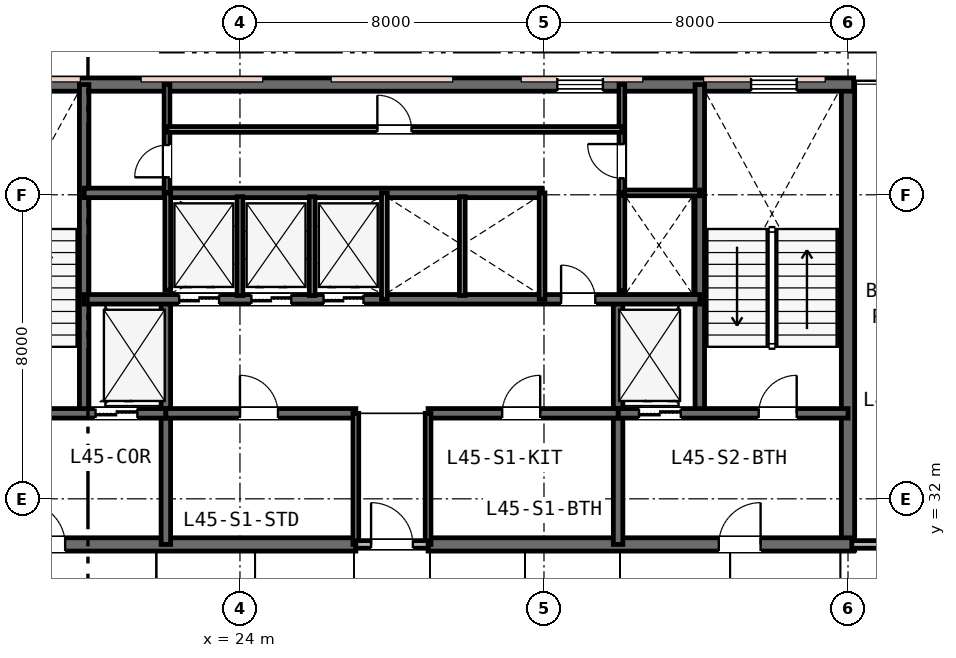
"""IFC4 building model, lengths in metres.
Left out: names, types, materials, properties, quantities, classifications, styles, units other than length and angle.
Written with IfcOpenShell. Run it as: python <this file> out.ifc"""

import sys

from ifc_helpers import new_model, si_unit, direction, frame, frame_2d, origin, place, context, subcontext, project, spatial, rectangle, extrude, element, fill, save


model = new_model("IFC4")
c1 = context("Model", 3, precision=1e-05, world=origin(), true_north=direction((0.0, 1.0)))
c2 = subcontext(c1, "Body", "Model", "MODEL_VIEW")
j1 = project(units=[si_unit("LENGTHUNIT", "METRE"), si_unit("PLANEANGLEUNIT", "RADIAN")], contexts=[c1])
p1 = place(None, origin())
s1 = spatial("IfcSite", under=j1, at=p1, CompositionType="ELEMENT")
p2 = place(p1, origin())
s2 = spatial("IfcBuilding", under=s1, at=p2, CompositionType="ELEMENT")
p3 = place(p2, frame((0.0, 0.0, 175.8)))
s3 = spatial("IfcBuildingStorey", under=s2, at=p3, CompositionType="ELEMENT", Elevation=175.8)
p4 = place(p3, frame((40.0, 30.65, 0.0), z_axis=(0.0, 0.0, 1.0), x_axis=(0.0, 1.0, 0.0)))
e1 = element("IfcWall", 1, at=p4, inside=s3, PredefinedType="SHEAR", context=c2, shape_type="SweptSolid", body=[
    extrude(rectangle(XDim=12.3, YDim=0.35, at=frame_2d((6.15, 0.0))), origin(), (0.0, 0.0, 1.0), 3.6),
])
p5 = place(p3, frame((15.85, 42.9, 0.0), z_axis=(0.0, 0.0, 1.0), x_axis=(1.0, 0.0, 0.0)))
e2 = element("IfcWall", 2, at=p5, inside=s3, PredefinedType="SHEAR", context=c2, shape_type="SweptSolid", body=[
    extrude(rectangle(XDim=24.3, YDim=0.35, at=frame_2d((12.15, 0.0))), origin(), (0.0, 0.0, 1.0), 3.6),
])
p6 = place(p5, frame((1.6, 0.0, 0.95)))
e3 = element("IfcOpeningElement", 3, at=p6, cuts=e2, PredefinedType="OPENING", context=c2, shape_type="SweptSolid", body=[
    extrude(rectangle(XDim=1.2, YDim=1.6, at=frame_2d((0.6, 0.8))), frame((0.0, 0.185, 0.0), z_axis=(0.0, -1.0, 0.0), x_axis=(1.0, 0.0, 0.0)), (0.0, 0.0, 1.0), 0.37),
])
p7 = place(p5, frame((16.5, 0.0, 0.95)))
e4 = element("IfcOpeningElement", 4, at=p7, cuts=e2, PredefinedType="OPENING", context=c2, shape_type="SweptSolid", body=[
    extrude(rectangle(XDim=1.2, YDim=1.6, at=frame_2d((0.6, 0.8))), frame((0.0, 0.185, 0.0), z_axis=(0.0, -1.0, 0.0), x_axis=(1.0, 0.0, 0.0)), (0.0, 0.0, 1.0), 0.37),
])
p8 = place(p5, frame((21.6, 0.0, 0.95)))
e5 = element("IfcOpeningElement", 5, at=p8, cuts=e2, PredefinedType="OPENING", context=c2, shape_type="SweptSolid", body=[
    extrude(rectangle(XDim=1.2, YDim=1.6, at=frame_2d((0.6, 0.8))), frame((0.0, 0.185, 0.0), z_axis=(0.0, -1.0, 0.0), x_axis=(1.0, 0.0, 0.0)), (0.0, 0.0, 1.0), 0.37),
])
p9 = place(p3, frame((15.85, 30.8, 0.0), z_axis=(0.0, 0.0, 1.0), x_axis=(1.0, 0.0, 0.0)))
e6 = element("IfcWall", 6, at=p9, inside=s3, PredefinedType="SHEAR", context=c2, shape_type="SweptSolid", body=[
    extrude(rectangle(XDim=11.2, YDim=0.35, at=frame_2d((5.6, 0.0))), origin(), (0.0, 0.0, 1.0), 3.6),
])
p10 = place(p9, frame((2.45, 0.0, 0.0)))
e7 = element("IfcOpeningElement", 7, at=p10, cuts=e6, PredefinedType="OPENING", context=c2, shape_type="SweptSolid", body=[
    extrude(rectangle(XDim=1.1, YDim=2.15, at=frame_2d((0.55, 1.075))), frame((0.0, 0.185, 0.0), z_axis=(0.0, -1.0, 0.0), x_axis=(1.0, 0.0, 0.0)), (0.0, 0.0, 1.0), 0.37),
])
p11 = place(p3, frame((28.95, 30.8, 0.0), z_axis=(0.0, 0.0, 1.0), x_axis=(1.0, 0.0, 0.0)))
e8 = element("IfcWall", 8, at=p11, inside=s3, PredefinedType="SHEAR", context=c2, shape_type="SweptSolid", body=[
    extrude(rectangle(XDim=11.2, YDim=0.35, at=frame_2d((5.6, 0.0))), origin(), (0.0, 0.0, 1.0), 3.6),
])
p12 = place(p11, frame((7.65, 0.0, 0.0)))
e9 = element("IfcOpeningElement", 9, at=p12, cuts=e8, PredefinedType="OPENING", context=c2, shape_type="SweptSolid", body=[
    extrude(rectangle(XDim=1.1, YDim=2.15, at=frame_2d((0.55, 1.075))), frame((0.0, 0.185, 0.0), z_axis=(0.0, -1.0, 0.0), x_axis=(1.0, 0.0, 0.0)), (0.0, 0.0, 1.0), 0.37),
])
for number, where, z_axis, x_axis in (
    (10, (19.9, 34.25, 0.0), (0.0, 0.0, 1.0), (0.0, 1.0, 0.0)),
    (11, (36.1, 34.25, 0.0), (0.0, 0.0, 1.0), (0.0, 1.0, 0.0)),
):
    element("IfcWall", number, at=place(p3, frame(where, z_axis=z_axis, x_axis=x_axis)), inside=s3, PredefinedType="SHEAR", context=c2, shape_type="SweptSolid", body=[
        extrude(rectangle(XDim=8.65, YDim=0.25, at=frame_2d((4.325, 0.0))), origin(), (0.0, 0.0, 1.0), 3.6),
    ])
for number, where, z_axis, x_axis in (
    (12, (22.05, 30.8, 0.0), (0.0, 0.0, 1.0), (0.0, 1.0, 0.0)),
    (13, (33.95, 30.8, 0.0), (0.0, 0.0, 1.0), (0.0, 1.0, 0.0)),
):
    element("IfcWall", number, at=place(p3, frame(where, z_axis=z_axis, x_axis=x_axis)), inside=s3, PredefinedType="SHEAR", context=c2, shape_type="SweptSolid", body=[
        extrude(rectangle(XDim=6.45, YDim=0.25, at=frame_2d((3.225, 0.0))), origin(), (0.0, 0.0, 1.0), 3.6),
    ])
p13 = place(p3, frame((16.0, 34.25, 0.0), z_axis=(0.0, 0.0, 1.0), x_axis=(1.0, 0.0, 0.0)))
e14 = element("IfcWall", 14, at=p13, inside=s3, PredefinedType="SHEAR", context=c2, shape_type="SweptSolid", body=[
    extrude(rectangle(XDim=6.05, YDim=0.25, at=frame_2d((3.025, 0.0))), origin(), (0.0, 0.0, 1.0), 3.6),
])
p14 = place(p13, frame((1.25, 0.0, 0.0)))
e15 = element("IfcOpeningElement", 15, at=p14, cuts=e14, PredefinedType="OPENING", context=c2, shape_type="SweptSolid", body=[
    extrude(rectangle(XDim=1.0, YDim=2.15, at=frame_2d((0.5, 1.075))), frame((0.0, 0.135, 0.0), z_axis=(0.0, -1.0, 0.0), x_axis=(1.0, 0.0, 0.0)), (0.0, 0.0, 1.0), 0.27),
])
p15 = place(p13, frame((4.2, 0.0, 0.0)))
e16 = element("IfcOpeningElement", 16, at=p15, cuts=e14, PredefinedType="OPENING", context=c2, shape_type="SweptSolid", body=[
    extrude(rectangle(XDim=1.1, YDim=2.15, at=frame_2d((0.55, 1.075))), frame((0.0, 0.135, 0.0), z_axis=(0.0, -1.0, 0.0), x_axis=(1.0, 0.0, 0.0)), (0.0, 0.0, 1.0), 0.27),
])
p16 = place(p3, frame((33.95, 34.25, 0.0), z_axis=(0.0, 0.0, 1.0), x_axis=(1.0, 0.0, 0.0)))
e17 = element("IfcWall", 17, at=p16, inside=s3, PredefinedType="SHEAR", context=c2, shape_type="SweptSolid", body=[
    extrude(rectangle(XDim=6.05, YDim=0.25, at=frame_2d((3.025, 0.0))), origin(), (0.0, 0.0, 1.0), 3.6),
])
p17 = place(p16, frame((3.7, 0.0, 0.0)))
e18 = element("IfcOpeningElement", 18, at=p17, cuts=e17, PredefinedType="OPENING", context=c2, shape_type="SweptSolid", body=[
    extrude(rectangle(XDim=1.0, YDim=2.15, at=frame_2d((0.5, 1.075))), frame((0.0, 0.135, 0.0), z_axis=(0.0, -1.0, 0.0), x_axis=(1.0, 0.0, 0.0)), (0.0, 0.0, 1.0), 0.27),
])
p18 = place(p16, frame((0.55, 0.0, 0.0)))
e19 = element("IfcOpeningElement", 19, at=p18, cuts=e17, PredefinedType="OPENING", context=c2, shape_type="SweptSolid", body=[
    extrude(rectangle(XDim=1.1, YDim=2.15, at=frame_2d((0.55, 1.075))), frame((0.0, 0.135, 0.0), z_axis=(0.0, -1.0, 0.0), x_axis=(1.0, 0.0, 0.0)), (0.0, 0.0, 1.0), 0.27),
])
p19 = place(p3, frame((22.05, 34.25, 0.0), z_axis=(0.0, 0.0, 1.0), x_axis=(1.0, 0.0, 0.0)))
e20 = element("IfcWall", 20, at=p19, inside=s3, PredefinedType="SHEAR", context=c2, shape_type="SweptSolid", body=[
    extrude(rectangle(XDim=5.0, YDim=0.25, at=frame_2d((2.5, 0.0))), origin(), (0.0, 0.0, 1.0), 3.6),
])
p20 = place(p19, frame((1.95, 0.0, 0.0)))
e21 = element("IfcOpeningElement", 21, at=p20, cuts=e20, PredefinedType="OPENING", context=c2, shape_type="SweptSolid", body=[
    extrude(rectangle(XDim=1.0, YDim=2.15, at=frame_2d((0.5, 1.075))), frame((0.0, 0.135, 0.0), z_axis=(0.0, -1.0, 0.0), x_axis=(1.0, 0.0, 0.0)), (0.0, 0.0, 1.0), 0.27),
])
p21 = place(p3, frame((28.95, 34.25, 0.0), z_axis=(0.0, 0.0, 1.0), x_axis=(1.0, 0.0, 0.0)))
e22 = element("IfcWall", 22, at=p21, inside=s3, PredefinedType="SHEAR", context=c2, shape_type="SweptSolid", body=[
    extrude(rectangle(XDim=5.0, YDim=0.25, at=frame_2d((2.5, 0.0))), origin(), (0.0, 0.0, 1.0), 3.6),
])
p22 = place(p21, frame((1.95, 0.0, 0.0)))
e23 = element("IfcOpeningElement", 23, at=p22, cuts=e22, PredefinedType="OPENING", context=c2, shape_type="SweptSolid", body=[
    extrude(rectangle(XDim=1.0, YDim=2.15, at=frame_2d((0.5, 1.075))), frame((0.0, 0.135, 0.0), z_axis=(0.0, -1.0, 0.0), x_axis=(1.0, 0.0, 0.0)), (0.0, 0.0, 1.0), 0.27),
])
p23 = place(p3, frame((19.9, 37.25, 0.0), z_axis=(0.0, 0.0, 1.0), x_axis=(1.0, 0.0, 0.0)))
e24 = element("IfcWall", 24, at=p23, inside=s3, PredefinedType="SHEAR", context=c2, shape_type="SweptSolid", body=[
    extrude(rectangle(XDim=16.2, YDim=0.25, at=frame_2d((8.1, 0.0))), origin(), (0.0, 0.0, 1.0), 3.6),
])
p24 = place(p23, frame((12.55, 0.0, 0.0)))
e25 = element("IfcOpeningElement", 25, at=p24, cuts=e24, PredefinedType="OPENING", context=c2, shape_type="SweptSolid", body=[
    extrude(rectangle(XDim=0.9, YDim=2.15, at=frame_2d((0.45, 1.075))), frame((0.0, 0.135, 0.0), z_axis=(0.0, -1.0, 0.0), x_axis=(1.0, 0.0, 0.0)), (0.0, 0.0, 1.0), 0.27),
])
p25 = place(p23, frame((2.5, 0.0, 0.0)))
e26 = element("IfcOpeningElement", 26, at=p25, cuts=e24, PredefinedType="OPENING", context=c2, shape_type="SweptSolid", body=[
    extrude(rectangle(XDim=1.05, YDim=2.15, at=frame_2d((0.525, 1.075))), frame((0.0, 0.135, 0.0), z_axis=(0.0, -1.0, 0.0), x_axis=(1.0, 0.0, 0.0)), (0.0, 0.0, 1.0), 0.27),
])
p26 = place(p23, frame((4.4, 0.0, 0.0)))
e27 = element("IfcOpeningElement", 27, at=p26, cuts=e24, PredefinedType="OPENING", context=c2, shape_type="SweptSolid", body=[
    extrude(rectangle(XDim=1.05, YDim=2.15, at=frame_2d((0.525, 1.075))), frame((0.0, 0.135, 0.0), z_axis=(0.0, -1.0, 0.0), x_axis=(1.0, 0.0, 0.0)), (0.0, 0.0, 1.0), 0.27),
])
p27 = place(p23, frame((6.3, 0.0, 0.0)))
e28 = element("IfcOpeningElement", 28, at=p27, cuts=e24, PredefinedType="OPENING", context=c2, shape_type="SweptSolid", body=[
    extrude(rectangle(XDim=1.05, YDim=2.15, at=frame_2d((0.525, 1.075))), frame((0.0, 0.135, 0.0), z_axis=(0.0, -1.0, 0.0), x_axis=(1.0, 0.0, 0.0)), (0.0, 0.0, 1.0), 0.27),
])
p28 = place(p3, frame((19.9, 40.05, 0.0), z_axis=(0.0, 0.0, 1.0), x_axis=(1.0, 0.0, 0.0)))
e29 = element("IfcWall", 29, at=p28, inside=s3, PredefinedType="SHEAR", context=c2, shape_type="SweptSolid", body=[
    extrude(rectangle(XDim=12.05, YDim=0.25, at=frame_2d((6.025, 0.0))), origin(), (0.0, 0.0, 1.0), 3.6),
])
for number, where, z_axis, x_axis in (
    (30, (27.05, 30.8, 0.0), (0.0, 0.0, 1.0), (0.0, 1.0, 0.0)),
    (31, (28.95, 30.8, 0.0), (0.0, 0.0, 1.0), (0.0, 1.0, 0.0)),
):
    element("IfcWall", number, at=place(p3, frame(where, z_axis=z_axis, x_axis=x_axis)), inside=s3, PredefinedType="PLUMBINGWALL", context=c2, shape_type="SweptSolid", body=[
        extrude(rectangle(XDim=3.45, YDim=0.15, at=frame_2d((1.725, 0.0))), origin(), (0.0, 0.0, 1.0), 3.07),
    ])
p29 = place(p3, frame((27.05, 30.8, 0.0), z_axis=(0.0, 0.0, 1.0), x_axis=(1.0, 0.0, 0.0)))
e32 = element("IfcWall", 32, at=p29, inside=s3, PredefinedType="PARTITIONING", context=c2, shape_type="SweptSolid", body=[
    extrude(rectangle(XDim=1.9, YDim=0.2, at=frame_2d((0.95, 0.0))), origin(), (0.0, 0.0, 1.0), 3.07),
])
p30 = place(p29, frame((0.4, 0.0, 0.0)))
e33 = element("IfcOpeningElement", 33, at=p30, cuts=e32, PredefinedType="OPENING", context=c2, shape_type="SweptSolid", body=[
    extrude(rectangle(XDim=1.1, YDim=2.15, at=frame_2d((0.55, 1.075))), frame((0.0, 0.11, 0.0), z_axis=(0.0, -1.0, 0.0), x_axis=(1.0, 0.0, 0.0)), (0.0, 0.0, 1.0), 0.22),
])
p31 = place(p3, frame((22.1, 37.49, 0.0), z_axis=(0.0, 0.0, 1.0), x_axis=(0.0, 1.0, 0.0)))
e34 = element("IfcWall", 34, at=p31, inside=s3, PredefinedType="PLUMBINGWALL", context=c2, shape_type="SweptSolid", body=[
    extrude(rectangle(XDim=2.56, YDim=0.15, at=frame_2d((1.28, 0.0))), origin(), (0.0, 0.0, 1.0), 3.33),
])
p32 = place(p3, frame((27.8, 37.25, 0.0), z_axis=(0.0, 0.0, 1.0), x_axis=(0.0, 1.0, 0.0)))
e35 = element("IfcWall", 35, at=p32, inside=s3, PredefinedType="PLUMBINGWALL", context=c2, shape_type="SweptSolid", body=[
    extrude(rectangle(XDim=2.8, YDim=0.15, at=frame_2d((1.4, 0.0))), origin(), (0.0, 0.0, 1.0), 3.33),
])
for number, where, z_axis, x_axis in (
    (36, (24.0, 37.35, 0.0), (0.0, 0.0, 1.0), (0.0, 1.0, 0.0)),
    (37, (25.9, 37.35, 0.0), (0.0, 0.0, 1.0), (0.0, 1.0, 0.0)),
):
    element("IfcWall", number, at=place(p3, frame(where, z_axis=z_axis, x_axis=x_axis)), inside=s3, PredefinedType="PLUMBINGWALL", context=c2, shape_type="SweptSolid", body=[
        extrude(rectangle(XDim=2.6, YDim=0.15, at=frame_2d((1.3, 0.0))), origin(), (0.0, 0.0, 1.0), 3.33),
    ])
p33 = place(p3, frame((31.95, 37.25, 0.0), z_axis=(0.0, 0.0, 1.0), x_axis=(0.0, 1.0, 0.0)))
e38 = element("IfcWall", 38, at=p33, inside=s3, PredefinedType="PLUMBINGWALL", context=c2, shape_type="SweptSolid", body=[
    extrude(rectangle(XDim=2.8, YDim=0.15, at=frame_2d((1.4, 0.0))), origin(), (0.0, 0.0, 1.0), 3.33),
])
p34 = place(p3, frame((29.85, 37.35, 0.0), z_axis=(0.0, 0.0, 1.0), x_axis=(0.0, 1.0, 0.0)))
e39 = element("IfcWall", 39, at=p34, inside=s3, PredefinedType="PLUMBINGWALL", context=c2, shape_type="SweptSolid", body=[
    extrude(rectangle(XDim=2.6, YDim=0.15, at=frame_2d((1.3, 0.0))), origin(), (0.0, 0.0, 1.0), 3.33),
])
p35 = place(p3, frame((34.05, 37.473, 0.0), z_axis=(0.0, 0.0, 1.0), x_axis=(0.0, 1.0, 0.0)))
e40 = element("IfcWall", 40, at=p35, inside=s3, PredefinedType="PLUMBINGWALL", context=c2, shape_type="SweptSolid", body=[
    extrude(rectangle(XDim=2.577, YDim=0.15, at=frame_2d((1.288, 0.0))), origin(), (0.0, 0.0, 1.0), 3.33),
])
p36 = place(p3, frame((34.05, 40.05, 0.0), z_axis=(0.0, 0.0, 1.0), x_axis=(1.0, 0.0, 0.0)))
e41 = element("IfcWall", 41, at=p36, inside=s3, PredefinedType="PARTITIONING", context=c2, shape_type="SweptSolid", body=[
    extrude(rectangle(XDim=2.05, YDim=0.15, at=frame_2d((1.025, 0.0))), origin(), (0.0, 0.0, 1.0), 3.33),
])
p37 = place(p3, frame((34.05, 40.05, 0.0), z_axis=(0.0, 0.0, 1.0), x_axis=(0.0, 1.0, 0.0)))
e42 = element("IfcWall", 42, at=p37, inside=s3, PredefinedType="PARTITIONING", context=c2, shape_type="SweptSolid", body=[
    extrude(rectangle(XDim=2.85, YDim=0.15, at=frame_2d((1.425, 0.0))), origin(), (0.0, 0.0, 1.0), 3.33),
])
p38 = place(p37, frame((0.385, 0.0, 0.0)))
e43 = element("IfcOpeningElement", 43, at=p38, cuts=e42, PredefinedType="OPENING", context=c2, shape_type="SweptSolid", body=[
    extrude(rectangle(XDim=0.9, YDim=2.15, at=frame_2d((0.45, 1.075))), frame((0.0, 0.085, 0.0), z_axis=(0.0, -1.0, 0.0), x_axis=(1.0, 0.0, 0.0)), (0.0, 0.0, 1.0), 0.17),
])
p39 = place(p3, frame((22.08, 40.05, 0.0), z_axis=(0.0, 0.0, 1.0), x_axis=(0.0, 1.0, 0.0)))
e44 = element("IfcWall", 44, at=p39, inside=s3, PredefinedType="PARTITIONING", context=c2, shape_type="SweptSolid", body=[
    extrude(rectangle(XDim=2.85, YDim=0.15, at=frame_2d((1.425, 0.0))), origin(), (0.0, 0.0, 1.0), 3.33),
])
p40 = place(p39, frame((0.41, 0.0, 0.0)))
e45 = element("IfcOpeningElement", 45, at=p40, cuts=e44, PredefinedType="OPENING", context=c2, shape_type="SweptSolid", body=[
    extrude(rectangle(XDim=0.85, YDim=2.15, at=frame_2d((0.425, 1.075))), frame((0.0, 0.085, 0.0), z_axis=(0.0, -1.0, 0.0), x_axis=(1.0, 0.0, 0.0)), (0.0, 0.0, 1.0), 0.17),
])
p41 = place(p3, frame((22.08, 41.72, 0.0), z_axis=(0.0, 0.0, 1.0), x_axis=(1.0, 0.0, 0.0)))
e46 = element("IfcWall", 46, at=p41, inside=s3, PredefinedType="PARTITIONING", context=c2, shape_type="SweptSolid", body=[
    extrude(rectangle(XDim=11.97, YDim=0.15, at=frame_2d((5.985, 0.0))), origin(), (0.0, 0.0, 1.0), 3.33),
])
p42 = place(p41, frame((5.535, 0.0, 0.0)))
e47 = element("IfcOpeningElement", 47, at=p42, cuts=e46, PredefinedType="OPENING", context=c2, shape_type="SweptSolid", body=[
    extrude(rectangle(XDim=0.9, YDim=2.15, at=frame_2d((0.45, 1.075))), frame((0.0, 0.085, 0.0), z_axis=(0.0, -1.0, 0.0), x_axis=(1.0, 0.0, 0.0)), (0.0, 0.0, 1.0), 0.17),
])
p43 = place(p3, frame((40.1, 30.8, 0.0), z_axis=(0.0, 0.0, 1.0), x_axis=(1.0, 0.0, 0.0)))
e48 = element("IfcWall", 48, at=p43, inside=s3, PredefinedType="PARTITIONING", context=c2, shape_type="SweptSolid", body=[
    extrude(rectangle(XDim=4.1, YDim=0.2, at=frame_2d((2.05, 0.0))), origin(), (0.0, 0.0, 1.0), 2.92),
])
p44 = place(p43, frame((1.575, 0.0, 0.0)))
e49 = element("IfcOpeningElement", 49, at=p44, cuts=e48, PredefinedType="OPENING", context=c2, shape_type="SweptSolid", body=[
    extrude(rectangle(XDim=0.95, YDim=2.15, at=frame_2d((0.475, 1.075))), frame((0.0, 0.11, 0.0), z_axis=(0.0, -1.0, 0.0), x_axis=(1.0, 0.0, 0.0)), (0.0, 0.0, 1.0), 0.22),
])
p45 = place(p7, origin())
e50 = element("IfcWindow", 50, at=p45, inside=s3, PartitioningType="SINGLE_PANEL", PredefinedType="WINDOW", context=c2, shape_type="SweptSolid", body=[
    extrude(rectangle(XDim=1.2, YDim=1.6, at=frame_2d((0.6, 0.8))), frame((0.0, 0.03, 0.0), z_axis=(0.0, -1.0, 0.0), x_axis=(1.0, 0.0, 0.0)), (0.0, 0.0, 1.0), 0.06),
])
fill(e4, e50)
p46 = place(p8, origin())
e51 = element("IfcWindow", 51, at=p46, inside=s3, PartitioningType="SINGLE_PANEL", PredefinedType="WINDOW", context=c2, shape_type="SweptSolid", body=[
    extrude(rectangle(XDim=1.2, YDim=1.6, at=frame_2d((0.6, 0.8))), frame((0.0, 0.03, 0.0), z_axis=(0.0, -1.0, 0.0), x_axis=(1.0, 0.0, 0.0)), (0.0, 0.0, 1.0), 0.06),
])
fill(e5, e51)
p47 = place(p30, origin())
e52 = element("IfcDoor", 52, at=p47, inside=s3, OperationType="SINGLE_SWING_LEFT", PredefinedType="DOOR", context=c2, shape_type="SweptSolid", body=[
    extrude(rectangle(XDim=1.1, YDim=2.15, at=frame_2d((0.55, 1.075))), frame((0.0, 0.025, 0.0), z_axis=(0.0, -1.0, 0.0), x_axis=(1.0, 0.0, 0.0)), (0.0, 0.0, 1.0), 0.05),
])
fill(e33, e52)
p48 = place(p17, origin())
e53 = element("IfcDoor", 53, at=p48, inside=s3, OperationType="SINGLE_SWING_RIGHT", PredefinedType="DOOR", context=c2, shape_type="SweptSolid", body=[
    extrude(rectangle(XDim=1.0, YDim=2.15, at=frame_2d((0.5, 1.075))), frame((0.0, 0.025, 0.0), z_axis=(0.0, -1.0, 0.0), x_axis=(1.0, 0.0, 0.0)), (0.0, 0.0, 1.0), 0.05),
])
fill(e18, e53)
p49 = place(p10, origin())
e54 = element("IfcDoor", 54, at=p49, inside=s3, OperationType="SINGLE_SWING_LEFT", PredefinedType="DOOR", context=c2, shape_type="SweptSolid", body=[
    extrude(rectangle(XDim=1.1, YDim=2.15, at=frame_2d((0.55, 1.075))), frame((0.0, 0.025, 0.0), z_axis=(0.0, -1.0, 0.0), x_axis=(1.0, 0.0, 0.0)), (0.0, 0.0, 1.0), 0.05),
])
fill(e7, e54)
p50 = place(p12, origin())
e55 = element("IfcDoor", 55, at=p50, inside=s3, OperationType="SINGLE_SWING_RIGHT", PredefinedType="DOOR", context=c2, shape_type="SweptSolid", body=[
    extrude(rectangle(XDim=1.1, YDim=2.15, at=frame_2d((0.55, 1.075))), frame((0.0, 0.025, 0.0), z_axis=(0.0, -1.0, 0.0), x_axis=(1.0, 0.0, 0.0)), (0.0, 0.0, 1.0), 0.05),
])
fill(e9, e55)
p51 = place(p20, origin())
e56 = element("IfcDoor", 56, at=p51, inside=s3, OperationType="SINGLE_SWING_LEFT", PredefinedType="DOOR", context=c2, shape_type="SweptSolid", body=[
    extrude(rectangle(XDim=1.0, YDim=2.15, at=frame_2d((0.5, 1.075))), frame((0.0, 0.025, 0.0), z_axis=(0.0, -1.0, 0.0), x_axis=(1.0, 0.0, 0.0)), (0.0, 0.0, 1.0), 0.05),
])
fill(e21, e56)
p52 = place(p22, origin())
e57 = element("IfcDoor", 57, at=p52, inside=s3, OperationType="SINGLE_SWING_RIGHT", PredefinedType="DOOR", context=c2, shape_type="SweptSolid", body=[
    extrude(rectangle(XDim=1.0, YDim=2.15, at=frame_2d((0.5, 1.075))), frame((0.0, 0.025, 0.0), z_axis=(0.0, -1.0, 0.0), x_axis=(1.0, 0.0, 0.0)), (0.0, 0.0, 1.0), 0.05),
])
fill(e23, e57)
p53 = place(p24, origin())
e58 = element("IfcDoor", 58, at=p53, inside=s3, OperationType="SINGLE_SWING_LEFT", PredefinedType="DOOR", context=c2, shape_type="SweptSolid", body=[
    extrude(rectangle(XDim=0.9, YDim=2.15, at=frame_2d((0.45, 1.075))), frame((0.0, 0.025, 0.0), z_axis=(0.0, -1.0, 0.0), x_axis=(1.0, 0.0, 0.0)), (0.0, 0.0, 1.0), 0.05),
])
fill(e25, e58)
p54 = place(p38, origin())
e59 = element("IfcDoor", 59, at=p54, inside=s3, OperationType="SINGLE_SWING_RIGHT", PredefinedType="DOOR", context=c2, shape_type="SweptSolid", body=[
    extrude(rectangle(XDim=0.9, YDim=2.15, at=frame_2d((0.45, 1.075))), frame((0.0, 0.025, 0.0), z_axis=(0.0, -1.0, 0.0), x_axis=(1.0, 0.0, 0.0)), (0.0, 0.0, 1.0), 0.05),
])
fill(e43, e59)
p55 = place(p40, origin())
e60 = element("IfcDoor", 60, at=p55, inside=s3, OperationType="SINGLE_SWING_LEFT", PredefinedType="DOOR", context=c2, shape_type="SweptSolid", body=[
    extrude(rectangle(XDim=0.85, YDim=2.15, at=frame_2d((0.425, 1.075))), frame((0.0, 0.025, 0.0), z_axis=(0.0, -1.0, 0.0), x_axis=(1.0, 0.0, 0.0)), (0.0, 0.0, 1.0), 0.05),
])
fill(e45, e60)
p56 = place(p42, origin())
e61 = element("IfcDoor", 61, at=p56, inside=s3, OperationType="SINGLE_SWING_LEFT", PredefinedType="DOOR", context=c2, shape_type="SweptSolid", body=[
    extrude(rectangle(XDim=0.9, YDim=2.15, at=frame_2d((0.45, 1.075))), frame((0.0, 0.025, 0.0), z_axis=(0.0, -1.0, 0.0), x_axis=(1.0, 0.0, 0.0)), (0.0, 0.0, 1.0), 0.05),
])
fill(e47, e61)
p57 = place(p15, origin())
e62 = element("IfcDoor", 62, at=p57, inside=s3, OperationType="DOUBLE_DOOR_SLIDING", PredefinedType="DOOR", context=c2, shape_type="SweptSolid", body=[
    extrude(rectangle(XDim=1.1, YDim=2.15, at=frame_2d((0.55, 1.075))), frame((0.0, 0.025, 0.0), z_axis=(0.0, -1.0, 0.0), x_axis=(1.0, 0.0, 0.0)), (0.0, 0.0, 1.0), 0.05),
])
fill(e16, e62)
p58 = place(p18, origin())
e63 = element("IfcDoor", 63, at=p58, inside=s3, OperationType="DOUBLE_DOOR_SLIDING", PredefinedType="DOOR", context=c2, shape_type="SweptSolid", body=[
    extrude(rectangle(XDim=1.1, YDim=2.15, at=frame_2d((0.55, 1.075))), frame((0.0, 0.025, 0.0), z_axis=(0.0, -1.0, 0.0), x_axis=(1.0, 0.0, 0.0)), (0.0, 0.0, 1.0), 0.05),
])
fill(e19, e63)
p59 = place(p25, origin())
e64 = element("IfcDoor", 64, at=p59, inside=s3, OperationType="DOUBLE_DOOR_SLIDING", PredefinedType="DOOR", context=c2, shape_type="SweptSolid", body=[
    extrude(rectangle(XDim=1.05, YDim=2.15, at=frame_2d((0.525, 1.075))), frame((0.0, 0.025, 0.0), z_axis=(0.0, -1.0, 0.0), x_axis=(1.0, 0.0, 0.0)), (0.0, 0.0, 1.0), 0.05),
])
fill(e26, e64)
p60 = place(p26, origin())
e65 = element("IfcDoor", 65, at=p60, inside=s3, OperationType="DOUBLE_DOOR_SLIDING", PredefinedType="DOOR", context=c2, shape_type="SweptSolid", body=[
    extrude(rectangle(XDim=1.05, YDim=2.15, at=frame_2d((0.525, 1.075))), frame((0.0, 0.025, 0.0), z_axis=(0.0, -1.0, 0.0), x_axis=(1.0, 0.0, 0.0)), (0.0, 0.0, 1.0), 0.05),
])
fill(e27, e65)
p61 = place(p27, origin())
e66 = element("IfcDoor", 66, at=p61, inside=s3, OperationType="DOUBLE_DOOR_SLIDING", PredefinedType="DOOR", context=c2, shape_type="SweptSolid", body=[
    extrude(rectangle(XDim=1.05, YDim=2.15, at=frame_2d((0.525, 1.075))), frame((0.0, 0.025, 0.0), z_axis=(0.0, -1.0, 0.0), x_axis=(1.0, 0.0, 0.0)), (0.0, 0.0, 1.0), 0.05),
])
fill(e28, e66)
save(model, sys.argv[1])
